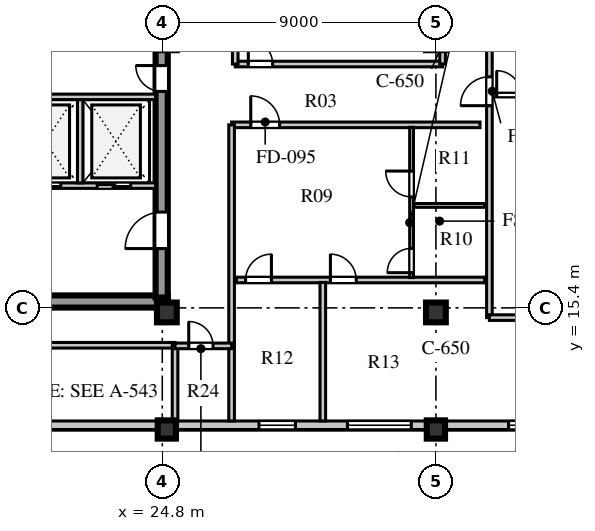
"""IFC4 building model, lengths in metres.
Left out: names, types, materials, properties, quantities, classifications, styles, units other than length and angle.
Written with IfcOpenShell. Run it as: python <this file> out.ifc"""

import sys

from ifc_helpers import new_model, si_unit, direction, frame, frame_2d, origin, origin_2d, place, context, subcontext, project, spatial, rectangle, extrude, element, fill, save


model = new_model("IFC4")
c1 = context("Model", 3, precision=1e-05, world=origin(), true_north=direction((0.0, 1.0)))
c2 = subcontext(c1, "Body", "Model", "MODEL_VIEW")
j1 = project(units=[si_unit("LENGTHUNIT", "METRE"), si_unit("PLANEANGLEUNIT", "RADIAN")], contexts=[c1])
p1 = place(None, origin())
s1 = spatial("IfcSite", under=j1, at=p1, CompositionType="ELEMENT")
p2 = place(p1, origin())
s2 = spatial("IfcBuilding", under=s1, at=p2, CompositionType="ELEMENT")
p3 = place(p2, frame((0.0, 0.0, 335.3)))
s3 = spatial("IfcBuildingStorey", under=s2, at=p3, CompositionType="ELEMENT", Elevation=335.3)
p4 = place(p3, frame((15.5, 15.61, 0.0), z_axis=(0.0, 0.0, 1.0), x_axis=(1.0, 0.0, 0.0)))
e1 = element("IfcWall", 1, at=p4, inside=s3, PredefinedType="SHEAR", context=c2, shape_type="SweptSolid", body=[
    extrude(rectangle(XDim=9.48, YDim=0.4, at=frame_2d((4.74, 0.0))), origin(), (0.0, 0.0, 1.0), 3.56),
])
p5 = place(p3, frame((24.78, 15.74, 0.0), z_axis=(0.0, 0.0, 1.0), x_axis=(0.0, 1.0, 0.0)))
e2 = element("IfcWall", 2, at=p5, inside=s3, PredefinedType="SHEAR", context=c2, shape_type="SweptSolid", body=[
    extrude(rectangle(XDim=25.76, YDim=0.4, at=frame_2d((12.88, 0.0))), origin(), (0.0, 0.0, 1.0), 3.56),
])
p6 = place(p5, frame((1.61, 0.0, 0.0)))
e3 = element("IfcOpeningElement", 3, at=p6, cuts=e2, PredefinedType="OPENING", context=c2, shape_type="SweptSolid", body=[
    extrude(rectangle(XDim=1.2, YDim=2.1, at=frame_2d((0.6, 1.05))), frame((0.0, 0.21, 0.0), z_axis=(0.0, -1.0, 0.0), x_axis=(1.0, 0.0, 0.0)), (0.0, 0.0, 1.0), 0.42),
])
p7 = place(p5, frame((6.78, 0.0, 0.0)))
e4 = element("IfcOpeningElement", 4, at=p7, cuts=e2, PredefinedType="OPENING", context=c2, shape_type="SweptSolid", body=[
    extrude(rectangle(XDim=0.85, YDim=2.06, at=frame_2d((0.425, 1.03))), frame((0.0, 0.21, 0.0), z_axis=(0.0, -1.0, 0.0), x_axis=(1.0, 0.0, 0.0)), (0.0, 0.0, 1.0), 0.42),
])
p8 = place(p5, frame((12.11, 0.0, 0.0)))
e5 = element("IfcOpeningElement", 5, at=p8, cuts=e2, PredefinedType="OPENING", context=c2, shape_type="SweptSolid", body=[
    extrude(rectangle(XDim=1.5, YDim=2.12, at=frame_2d((0.75, 1.06))), frame((0.0, 0.21, 0.0), z_axis=(0.0, -1.0, 0.0), x_axis=(1.0, 0.0, 0.0)), (0.0, 0.0, 1.0), 0.42),
])
p9 = place(p5, frame((20.11, 0.0, 0.0)))
e6 = element("IfcOpeningElement", 6, at=p9, cuts=e2, PredefinedType="OPENING", context=c2, shape_type="SweptSolid", body=[
    extrude(rectangle(XDim=1.2, YDim=2.12, at=frame_2d((0.6, 1.06))), frame((0.0, 0.21, 0.0), z_axis=(0.0, -1.0, 0.0), x_axis=(1.0, 0.0, 0.0)), (0.0, 0.0, 1.0), 0.42),
])
p10 = place(p5, frame((24.01, 0.0, 0.0)))
e7 = element("IfcOpeningElement", 7, at=p10, cuts=e2, PredefinedType="OPENING", context=c2, shape_type="SweptSolid", body=[
    extrude(rectangle(XDim=0.95, YDim=2.1, at=frame_2d((0.475, 1.05))), frame((0.0, 0.21, 0.0), z_axis=(0.0, -1.0, 0.0), x_axis=(1.0, 0.0, 0.0)), (0.0, 0.0, 1.0), 0.42),
])
for number, where, z_axis, x_axis in (
    (8, (24.95, 15.25, 0.0), (0.0, 0.0, 1.0), (1.0, 0.0, 0.0)),
    (9, (33.8, 15.25, 0.0), (0.0, 0.0, 1.0), (1.0, 0.0, 0.0)),
):
    element("IfcColumn", number, at=place(p3, frame(where, z_axis=z_axis, x_axis=x_axis)), inside=s3, PredefinedType="COLUMN", context=c2, shape_type="SweptSolid", body=[
        extrude(rectangle(XDim=0.65, YDim=0.65, at=origin_2d()), origin(), (0.0, 0.0, 1.0), 3.56),
    ])
for number, where, z_axis, x_axis in (
    (10, (24.95, 11.4, 0.0), (0.0, 0.0, 1.0), (1.0, 0.0, 0.0)),
    (11, (33.8, 11.4, 0.0), (0.0, 0.0, 1.0), (1.0, 0.0, 0.0)),
):
    element("IfcColumn", number, at=place(p3, frame(where, z_axis=z_axis, x_axis=x_axis)), inside=s3, PredefinedType="COLUMN", context=c2, shape_type="SweptSolid", body=[
        extrude(rectangle(XDim=0.6, YDim=0.6, at=origin_2d()), origin(), (0.0, 0.0, 1.0), 3.56),
    ])
p11 = place(p3, frame((13.8, 11.54, 0.0), z_axis=(0.0, 0.0, 1.0), x_axis=(1.0, 0.0, 0.0)))
e12 = element("IfcWall", 12, at=p11, inside=s3, PredefinedType="STANDARD", context=c2, shape_type="SweptSolid", body=[
    extrude(rectangle(XDim=26.0, YDim=0.28, at=frame_2d((13.0, 0.0))), origin(), (0.0, 0.0, 1.0), 2.92),
])
p12 = place(p11, frame((5.8, 0.0, 0.8)))
e13 = element("IfcOpeningElement", 13, at=p12, cuts=e12, PredefinedType="OPENING", context=c2, shape_type="SweptSolid", body=[
    extrude(rectangle(XDim=1.2, YDim=1.75, at=frame_2d((0.6, 0.875))), frame((0.0, 0.15, 0.0), z_axis=(0.0, -1.0, 0.0), x_axis=(1.0, 0.0, 0.0)), (0.0, 0.0, 1.0), 0.3),
])
p13 = place(p11, frame((14.18, 0.0, 0.8)))
e14 = element("IfcOpeningElement", 14, at=p13, cuts=e12, PredefinedType="OPENING", context=c2, shape_type="SweptSolid", body=[
    extrude(rectangle(XDim=1.2, YDim=1.75, at=frame_2d((0.6, 0.875))), frame((0.0, 0.15, 0.0), z_axis=(0.0, -1.0, 0.0), x_axis=(1.0, 0.0, 0.0)), (0.0, 0.0, 1.0), 0.3),
])
p14 = place(p11, frame((17.09, 0.0, 0.8)))
e15 = element("IfcOpeningElement", 15, at=p14, cuts=e12, PredefinedType="OPENING", context=c2, shape_type="SweptSolid", body=[
    extrude(rectangle(XDim=2.1, YDim=1.95, at=frame_2d((1.05, 0.975))), frame((0.0, 0.15, 0.0), z_axis=(0.0, -1.0, 0.0), x_axis=(1.0, 0.0, 0.0)), (0.0, 0.0, 1.0), 0.3),
])
p15 = place(p11, frame((22.39, 0.0, 0.8)))
e16 = element("IfcOpeningElement", 16, at=p15, cuts=e12, PredefinedType="OPENING", context=c2, shape_type="SweptSolid", body=[
    extrude(rectangle(XDim=1.35, YDim=1.9, at=frame_2d((0.675, 0.95))), frame((0.0, 0.15, 0.0), z_axis=(0.0, -1.0, 0.0), x_axis=(1.0, 0.0, 0.0)), (0.0, 0.0, 1.0), 0.3),
])
p16 = place(p3, frame((19.64, 19.42, 0.0), z_axis=(0.0, 0.0, 1.0), x_axis=(1.0, 0.0, 0.0)))
e17 = element("IfcWall", 17, at=p16, inside=s3, PredefinedType="SOLIDWALL", context=c2, shape_type="SweptSolid", body=[
    extrude(rectangle(XDim=4.94, YDim=0.18, at=frame_2d((2.47, 0.0))), origin(), (0.0, 0.0, 1.0), 3.56),
])
p17 = place(p16, frame((0.72, 0.0, 0.0)))
e18 = element("IfcOpeningElement", 18, at=p17, cuts=e17, PredefinedType="OPENING", context=c2, shape_type="SweptSolid", body=[
    extrude(rectangle(XDim=1.1, YDim=2.1, at=frame_2d((0.55, 1.05))), frame((0.0, 0.1, 0.0), z_axis=(0.0, -1.0, 0.0), x_axis=(1.0, 0.0, 0.0)), (0.0, 0.0, 1.0), 0.2),
])
p18 = place(p16, frame((3.02, 0.0, 0.0)))
e19 = element("IfcOpeningElement", 19, at=p18, cuts=e17, PredefinedType="OPENING", context=c2, shape_type="SweptSolid", body=[
    extrude(rectangle(XDim=1.1, YDim=2.1, at=frame_2d((0.55, 1.05))), frame((0.0, 0.1, 0.0), z_axis=(0.0, -1.0, 0.0), x_axis=(1.0, 0.0, 0.0)), (0.0, 0.0, 1.0), 0.2),
])
p19 = place(p3, frame((22.1, 19.51, 0.0), z_axis=(0.0, 0.0, 1.0), x_axis=(0.0, 1.0, 0.0)))
e20 = element("IfcWall", 20, at=p19, inside=s3, PredefinedType="SOLIDWALL", context=c2, shape_type="SweptSolid", body=[
    extrude(rectangle(XDim=2.74, YDim=0.18, at=frame_2d((1.37, 0.0))), origin(), (0.0, 0.0, 1.0), 3.56),
])
p20 = place(p3, frame((19.64, 22.34, 0.0), z_axis=(0.0, 0.0, 1.0), x_axis=(1.0, 0.0, 0.0)))
e21 = element("IfcWall", 21, at=p20, inside=s3, PredefinedType="SOLIDWALL", context=c2, shape_type="SweptSolid", body=[
    extrude(rectangle(XDim=4.94, YDim=0.18, at=frame_2d((2.47, 0.0))), origin(), (0.0, 0.0, 1.0), 3.56),
])
p21 = place(p3, frame((27.08, 21.42, 0.0), z_axis=(0.0, 0.0, 1.0), x_axis=(1.0, 0.0, 0.0)))
e22 = element("IfcWall", 22, at=p21, inside=s3, PredefinedType="SOLIDWALL", context=c2, shape_type="SweptSolid", body=[
    extrude(rectangle(XDim=8.17, YDim=0.185, at=frame_2d((4.085, 0.0))), origin(), (0.0, 0.0, 1.0), 3.26),
])
p22 = place(p21, frame((0.63, 0.0, 0.0)))
e23 = element("IfcOpeningElement", 23, at=p22, cuts=e22, PredefinedType="OPENING", context=c2, shape_type="SweptSolid", body=[
    extrude(rectangle(XDim=0.95, YDim=2.1, at=frame_2d((0.475, 1.05))), frame((0.0, 0.103, 0.0), z_axis=(0.0, -1.0, 0.0), x_axis=(1.0, 0.0, 0.0)), (0.0, 0.0, 1.0), 0.205),
])
p23 = place(p3, frame((27.08, 11.68, 0.0), z_axis=(0.0, 0.0, 1.0), x_axis=(0.0, 1.0, 0.0)))
e24 = element("IfcWall", 24, at=p23, inside=s3, PredefinedType="SOLIDWALL", context=c2, shape_type="SweptSolid", body=[
    extrude(rectangle(XDim=9.74, YDim=0.185, at=frame_2d((4.87, 0.0))), origin(), (0.0, 0.0, 1.0), 3.56),
])
p24 = place(p3, frame((14.15, 14.17, 0.0), z_axis=(0.0, 0.0, 1.0), x_axis=(1.0, 0.0, 0.0)))
e25 = element("IfcWall", 25, at=p24, inside=s3, PredefinedType="SOLIDWALL", context=c2, shape_type="SweptSolid", body=[
    extrude(rectangle(XDim=11.07, YDim=0.185, at=frame_2d((5.535, 0.0))), origin(), (0.0, 0.0, 1.0), 3.56),
])
p25 = place(p24, frame((3.2, 0.0, 0.0)))
e26 = element("IfcOpeningElement", 26, at=p25, cuts=e25, PredefinedType="OPENING", context=c2, shape_type="SweptSolid", body=[
    extrude(rectangle(XDim=0.95, YDim=2.08, at=frame_2d((0.475, 1.04))), frame((0.0, 0.103, 0.0), z_axis=(0.0, -1.0, 0.0), x_axis=(1.0, 0.0, 0.0)), (0.0, 0.0, 1.0), 0.205),
])
p26 = place(p3, frame((25.22, 11.68, 0.0), z_axis=(0.0, 0.0, 1.0), x_axis=(0.0, 1.0, 0.0)))
e27 = element("IfcWall", 27, at=p26, inside=s3, PredefinedType="SOLIDWALL", context=c2, shape_type="SweptSolid", body=[
    extrude(rectangle(XDim=2.49, YDim=0.185, at=frame_2d((1.245, 0.0))), origin(), (0.0, 0.0, 1.0), 3.11),
])
p27 = place(p3, frame((27.24, 16.317, 0.0), z_axis=(0.0, 0.0, 1.0), x_axis=(1.0, 0.0, 0.0)))
e28 = element("IfcWall", 28, at=p27, inside=s3, PredefinedType="SOLIDWALL", context=c2, shape_type="SweptSolid", body=[
    extrude(rectangle(XDim=8.16, YDim=0.185, at=frame_2d((4.08, 0.0))), origin(), (0.0, 0.0, 1.0), 3.56),
])
p28 = place(p27, frame((0.3, 0.0, 0.0)))
e29 = element("IfcOpeningElement", 29, at=p28, cuts=e28, PredefinedType="OPENING", context=c2, shape_type="SweptSolid", body=[
    extrude(rectangle(XDim=0.85, YDim=2.08, at=frame_2d((0.425, 1.04))), frame((0.0, 0.103, 0.0), z_axis=(0.0, -1.0, 0.0), x_axis=(1.0, 0.0, 0.0)), (0.0, 0.0, 1.0), 0.205),
])
p29 = place(p27, frame((3.09, 0.0, 0.0)))
e30 = element("IfcOpeningElement", 30, at=p29, cuts=e28, PredefinedType="OPENING", context=c2, shape_type="SweptSolid", body=[
    extrude(rectangle(XDim=0.85, YDim=2.08, at=frame_2d((0.425, 1.04))), frame((0.0, 0.103, 0.0), z_axis=(0.0, -1.0, 0.0), x_axis=(1.0, 0.0, 0.0)), (0.0, 0.0, 1.0), 0.205),
])
p30 = place(p3, frame((33.0, 16.397, 0.0), z_axis=(0.0, 0.0, 1.0), x_axis=(0.0, 1.0, 0.0)))
e31 = element("IfcWall", 31, at=p30, inside=s3, PredefinedType="PLUMBINGWALL", context=c2, shape_type="SweptSolid", body=[
    extrude(rectangle(XDim=4.943, YDim=0.125, at=frame_2d((2.472, 0.0))), origin(), (0.0, 0.0, 1.0), 3.56),
])
p31 = place(p30, frame((0.16, 0.0, 0.0)))
e32 = element("IfcOpeningElement", 32, at=p31, cuts=e31, PredefinedType="OPENING", context=c2, shape_type="SweptSolid", body=[
    extrude(rectangle(XDim=0.8, YDim=2.05, at=frame_2d((0.4, 1.025))), frame((0.0, 0.073, 0.0), z_axis=(0.0, -1.0, 0.0), x_axis=(1.0, 0.0, 0.0)), (0.0, 0.0, 1.0), 0.145),
])
p32 = place(p30, frame((2.653, 0.0, 0.0)))
e33 = element("IfcOpeningElement", 33, at=p32, cuts=e31, PredefinedType="OPENING", context=c2, shape_type="SweptSolid", body=[
    extrude(rectangle(XDim=0.85, YDim=2.08, at=frame_2d((0.425, 1.04))), frame((0.0, 0.073, 0.0), z_axis=(0.0, -1.0, 0.0), x_axis=(1.0, 0.0, 0.0)), (0.0, 0.0, 1.0), 0.145),
])
p33 = place(p3, frame((33.08, 18.77, 0.0), z_axis=(0.0, 0.0, 1.0), x_axis=(1.0, 0.0, 0.0)))
e34 = element("IfcWall", 34, at=p33, inside=s3, PredefinedType="PLUMBINGWALL", context=c2, shape_type="SweptSolid", body=[
    extrude(rectangle(XDim=2.32, YDim=0.125, at=frame_2d((1.16, 0.0))), origin(), (0.0, 0.0, 1.0), 3.56),
])
p34 = place(p3, frame((30.08, 11.68, 0.0), z_axis=(0.0, 0.0, 1.0), x_axis=(0.0, 1.0, 0.0)))
e35 = element("IfcWall", 35, at=p34, inside=s3, PredefinedType="SOLIDWALL", context=c2, shape_type="SweptSolid", body=[
    extrude(rectangle(XDim=4.557, YDim=0.185, at=frame_2d((2.279, 0.0))), origin(), (0.0, 0.0, 1.0), 3.56),
])
p35 = place(p3, frame((35.56, 15.08, 0.0), z_axis=(0.0, 0.0, 1.0), x_axis=(0.0, 1.0, 0.0)))
e36 = element("IfcWall", 36, at=p35, inside=s3, PredefinedType="SOLIDWALL", context=c2, shape_type="SweptSolid", body=[
    extrude(rectangle(XDim=12.17, YDim=0.185, at=frame_2d((6.085, 0.0))), origin(), (0.0, 0.0, 1.0), 3.56),
])
p36 = place(p35, frame((6.97, 0.0, 0.0)))
e37 = element("IfcOpeningElement", 37, at=p36, cuts=e36, PredefinedType="OPENING", context=c2, shape_type="SweptSolid", body=[
    extrude(rectangle(XDim=0.95, YDim=2.1, at=frame_2d((0.475, 1.05))), frame((0.0, 0.103, 0.0), z_axis=(0.0, -1.0, 0.0), x_axis=(1.0, 0.0, 0.0)), (0.0, 0.0, 1.0), 0.205),
])
p37 = place(p3, frame((35.56, 15.08, 0.0), z_axis=(0.0, 0.0, 1.0), x_axis=(1.0, 0.0, 0.0)))
e38 = element("IfcWall", 38, at=p37, inside=s3, PredefinedType="SOLIDWALL", context=c2, shape_type="SweptSolid", body=[
    extrude(rectangle(XDim=7.36, YDim=0.185, at=frame_2d((3.68, 0.0))), origin(), (0.0, 0.0, 1.0), 3.11),
])
p38 = place(p3, frame((35.64, 22.4, 0.0), z_axis=(0.0, 0.0, 1.0), x_axis=(1.0, 0.0, 0.0)))
e39 = element("IfcWall", 39, at=p38, inside=s3, PredefinedType="PLUMBINGWALL", context=c2, shape_type="SweptSolid", body=[
    extrude(rectangle(XDim=3.851, YDim=0.125, at=frame_2d((1.926, 0.0))), origin(), (0.0, 0.0, 1.0), 3.56),
])
p39 = place(p38, frame((0.16, 0.0, 0.0)))
e40 = element("IfcOpeningElement", 40, at=p39, cuts=e39, PredefinedType="OPENING", context=c2, shape_type="SweptSolid", body=[
    extrude(rectangle(XDim=0.8, YDim=2.05, at=frame_2d((0.4, 1.025))), frame((0.0, 0.073, 0.0), z_axis=(0.0, -1.0, 0.0), x_axis=(1.0, 0.0, 0.0)), (0.0, 0.0, 1.0), 0.145),
])
p40 = place(p38, frame((2.108, 0.0, 0.0)))
e41 = element("IfcOpeningElement", 41, at=p40, cuts=e39, PredefinedType="OPENING", context=c2, shape_type="SweptSolid", body=[
    extrude(rectangle(XDim=0.8, YDim=2.05, at=frame_2d((0.4, 1.025))), frame((0.0, 0.073, 0.0), z_axis=(0.0, -1.0, 0.0), x_axis=(1.0, 0.0, 0.0)), (0.0, 0.0, 1.0), 0.145),
])
p41 = place(p3, frame((27.2, 23.42, 0.0), z_axis=(0.0, 0.0, 1.0), x_axis=(1.0, 0.0, 0.0)))
e42 = element("IfcWall", 42, at=p41, inside=s3, PredefinedType="SOLIDWALL", context=c2, shape_type="SweptSolid", body=[
    extrude(rectangle(XDim=6.82, YDim=0.185, at=frame_2d((3.41, 0.0))), origin(), (0.0, 0.0, 1.0), 3.56),
])
p42 = place(p41, frame((0.43, 0.0, 0.0)))
e43 = element("IfcOpeningElement", 43, at=p42, cuts=e42, PredefinedType="OPENING", context=c2, shape_type="SweptSolid", body=[
    extrude(rectangle(XDim=0.8, YDim=2.05, at=frame_2d((0.4, 1.025))), frame((0.0, 0.103, 0.0), z_axis=(0.0, -1.0, 0.0), x_axis=(1.0, 0.0, 0.0)), (0.0, 0.0, 1.0), 0.205),
])
p43 = place(p3, frame((27.2, 23.42, 0.0), z_axis=(0.0, 0.0, 1.0), x_axis=(0.0, 1.0, 0.0)))
e44 = element("IfcWall", 44, at=p43, inside=s3, PredefinedType="SOLIDWALL", context=c2, shape_type="SweptSolid", body=[
    extrude(rectangle(XDim=1.46, YDim=0.185, at=frame_2d((0.73, 0.0))), origin(), (0.0, 0.0, 1.0), 3.56),
])
p44 = place(p3, frame((34.02, 23.42, 0.0), z_axis=(0.0, 0.0, 1.0), x_axis=(0.0, 1.0, 0.0)))
e45 = element("IfcWall", 45, at=p44, inside=s3, PredefinedType="SOLIDWALL", context=c2, shape_type="SweptSolid", body=[
    extrude(rectangle(XDim=1.46, YDim=0.185, at=frame_2d((0.73, 0.0))), origin(), (0.0, 0.0, 1.0), 2.96),
])
p45 = place(p3, frame((25.22, 14.15, 0.0), z_axis=(0.0, 0.0, 1.0), x_axis=(1.0, 0.0, 0.0)))
e46 = element("IfcWall", 46, at=p45, inside=s3, PredefinedType="SOLIDWALL", context=c2, shape_type="SweptSolid", body=[
    extrude(rectangle(XDim=1.86, YDim=0.185, at=frame_2d((0.93, 0.0))), origin(), (0.0, 0.0, 1.0), 3.56),
])
p46 = place(p45, frame((0.45, 0.0, 0.0)))
e47 = element("IfcOpeningElement", 47, at=p46, cuts=e46, PredefinedType="OPENING", context=c2, shape_type="SweptSolid", body=[
    extrude(rectangle(XDim=0.8, YDim=2.05, at=frame_2d((0.4, 1.025))), frame((0.0, 0.103, 0.0), z_axis=(0.0, -1.0, 0.0), x_axis=(1.0, 0.0, 0.0)), (0.0, 0.0, 1.0), 0.205),
])
p47 = place(p13, origin())
e48 = element("IfcWindow", 48, at=p47, inside=s3, PartitioningType="SINGLE_PANEL", PredefinedType="WINDOW", context=c2, shape_type="SweptSolid", body=[
    extrude(rectangle(XDim=1.2, YDim=1.75, at=frame_2d((0.6, 0.875))), frame((0.0, 0.03, 0.0), z_axis=(0.0, -1.0, 0.0), x_axis=(1.0, 0.0, 0.0)), (0.0, 0.0, 1.0), 0.06),
])
fill(e14, e48)
p48 = place(p14, origin())
e49 = element("IfcWindow", 49, at=p48, inside=s3, PartitioningType="SINGLE_PANEL", PredefinedType="WINDOW", context=c2, shape_type="SweptSolid", body=[
    extrude(rectangle(XDim=2.1, YDim=1.95, at=frame_2d((1.05, 0.975))), frame((0.0, 0.03, 0.0), z_axis=(0.0, -1.0, 0.0), x_axis=(1.0, 0.0, 0.0)), (0.0, 0.0, 1.0), 0.06),
])
fill(e15, e49)
p49 = place(p15, origin())
e50 = element("IfcWindow", 50, at=p49, inside=s3, PartitioningType="SINGLE_PANEL", PredefinedType="WINDOW", context=c2, shape_type="SweptSolid", body=[
    extrude(rectangle(XDim=1.35, YDim=1.9, at=frame_2d((0.675, 0.95))), frame((0.0, 0.03, 0.0), z_axis=(0.0, -1.0, 0.0), x_axis=(1.0, 0.0, 0.0)), (0.0, 0.0, 1.0), 0.06),
])
fill(e16, e50)
p50 = place(p17, origin())
e51 = element("IfcDoor", 51, at=p50, inside=s3, OperationType="DOUBLE_DOOR_SLIDING", PredefinedType="DOOR", context=c2, shape_type="SweptSolid", body=[
    extrude(rectangle(XDim=1.1, YDim=2.1, at=frame_2d((0.55, 1.05))), frame((0.0, 0.025, 0.0), z_axis=(0.0, -1.0, 0.0), x_axis=(1.0, 0.0, 0.0)), (0.0, 0.0, 1.0), 0.05),
])
fill(e18, e51)
p51 = place(p18, origin())
e52 = element("IfcDoor", 52, at=p51, inside=s3, OperationType="DOUBLE_DOOR_SLIDING", PredefinedType="DOOR", context=c2, shape_type="SweptSolid", body=[
    extrude(rectangle(XDim=1.1, YDim=2.1, at=frame_2d((0.55, 1.05))), frame((0.0, 0.025, 0.0), z_axis=(0.0, -1.0, 0.0), x_axis=(1.0, 0.0, 0.0)), (0.0, 0.0, 1.0), 0.05),
])
fill(e19, e52)
p52 = place(p6, frame((1.2, 0.0, 0.0), z_axis=(0.0, 0.0, 1.0), x_axis=(-1.0, 0.0, 0.0)))
e53 = element("IfcDoor", 53, at=p52, inside=s3, OperationType="SINGLE_SWING_RIGHT", PredefinedType="DOOR", context=c2, shape_type="SweptSolid", body=[
    extrude(rectangle(XDim=1.2, YDim=2.1, at=frame_2d((0.6, 1.05))), frame((0.0, 0.025, 0.0), z_axis=(0.0, -1.0, 0.0), x_axis=(1.0, 0.0, 0.0)), (0.0, 0.0, 1.0), 0.05),
])
fill(e3, e53)
p53 = place(p7, frame((0.85, 0.0, 0.0), z_axis=(0.0, 0.0, 1.0), x_axis=(-1.0, 0.0, 0.0)))
e54 = element("IfcDoor", 54, at=p53, inside=s3, OperationType="SINGLE_SWING_LEFT", PredefinedType="DOOR", context=c2, shape_type="SweptSolid", body=[
    extrude(rectangle(XDim=0.85, YDim=2.06, at=frame_2d((0.425, 1.03))), frame((0.0, 0.025, 0.0), z_axis=(0.0, -1.0, 0.0), x_axis=(1.0, 0.0, 0.0)), (0.0, 0.0, 1.0), 0.05),
])
fill(e4, e54)
p54 = place(p31, origin())
e55 = element("IfcDoor", 55, at=p54, inside=s3, OperationType="SINGLE_SWING_LEFT", PredefinedType="DOOR", context=c2, shape_type="SweptSolid", body=[
    extrude(rectangle(XDim=0.8, YDim=2.05, at=frame_2d((0.4, 1.025))), frame((0.0, 0.025, 0.0), z_axis=(0.0, -1.0, 0.0), x_axis=(1.0, 0.0, 0.0)), (0.0, 0.0, 1.0), 0.05),
])
fill(e32, e55)
p55 = place(p32, origin())
e56 = element("IfcDoor", 56, at=p55, inside=s3, OperationType="SINGLE_SWING_RIGHT", PredefinedType="DOOR", context=c2, shape_type="SweptSolid", body=[
    extrude(rectangle(XDim=0.85, YDim=2.08, at=frame_2d((0.425, 1.04))), frame((0.0, 0.025, 0.0), z_axis=(0.0, -1.0, 0.0), x_axis=(1.0, 0.0, 0.0)), (0.0, 0.0, 1.0), 0.05),
])
fill(e33, e56)
p56 = place(p28, frame((0.85, 0.0, 0.0), z_axis=(0.0, 0.0, 1.0), x_axis=(-1.0, 0.0, 0.0)))
e57 = element("IfcDoor", 57, at=p56, inside=s3, OperationType="SINGLE_SWING_LEFT", PredefinedType="DOOR", context=c2, shape_type="SweptSolid", body=[
    extrude(rectangle(XDim=0.85, YDim=2.08, at=frame_2d((0.425, 1.04))), frame((0.0, 0.025, 0.0), z_axis=(0.0, -1.0, 0.0), x_axis=(1.0, 0.0, 0.0)), (0.0, 0.0, 1.0), 0.05),
])
fill(e29, e57)
p57 = place(p29, frame((0.85, 0.0, 0.0), z_axis=(0.0, 0.0, 1.0), x_axis=(-1.0, 0.0, 0.0)))
e58 = element("IfcDoor", 58, at=p57, inside=s3, OperationType="SINGLE_SWING_RIGHT", PredefinedType="DOOR", context=c2, shape_type="SweptSolid", body=[
    extrude(rectangle(XDim=0.85, YDim=2.08, at=frame_2d((0.425, 1.04))), frame((0.0, 0.025, 0.0), z_axis=(0.0, -1.0, 0.0), x_axis=(1.0, 0.0, 0.0)), (0.0, 0.0, 1.0), 0.05),
])
fill(e30, e58)
p58 = place(p22, frame((0.95, 0.0, 0.0), z_axis=(0.0, 0.0, 1.0), x_axis=(-1.0, 0.0, 0.0)))
e59 = element("IfcDoor", 59, at=p58, inside=s3, OperationType="SINGLE_SWING_RIGHT", PredefinedType="DOOR", context=c2, shape_type="SweptSolid", body=[
    extrude(rectangle(XDim=0.95, YDim=2.1, at=frame_2d((0.475, 1.05))), frame((0.0, 0.025, 0.0), z_axis=(0.0, -1.0, 0.0), x_axis=(1.0, 0.0, 0.0)), (0.0, 0.0, 1.0), 0.05),
])
fill(e23, e59)
p59 = place(p39, origin())
e60 = element("IfcDoor", 60, at=p59, inside=s3, OperationType="SINGLE_SWING_LEFT", PredefinedType="DOOR", context=c2, shape_type="SweptSolid", body=[
    extrude(rectangle(XDim=0.8, YDim=2.05, at=frame_2d((0.4, 1.025))), frame((0.0, 0.025, 0.0), z_axis=(0.0, -1.0, 0.0), x_axis=(1.0, 0.0, 0.0)), (0.0, 0.0, 1.0), 0.05),
])
fill(e40, e60)
p60 = place(p36, origin())
e61 = element("IfcDoor", 61, at=p60, inside=s3, OperationType="SINGLE_SWING_LEFT", PredefinedType="DOOR", context=c2, shape_type="SweptSolid", body=[
    extrude(rectangle(XDim=0.95, YDim=2.1, at=frame_2d((0.475, 1.05))), frame((0.0, 0.025, 0.0), z_axis=(0.0, -1.0, 0.0), x_axis=(1.0, 0.0, 0.0)), (0.0, 0.0, 1.0), 0.05),
])
fill(e37, e61)
p61 = place(p42, origin())
e62 = element("IfcDoor", 62, at=p61, inside=s3, OperationType="SINGLE_SWING_LEFT", PredefinedType="DOOR", context=c2, shape_type="SweptSolid", body=[
    extrude(rectangle(XDim=0.8, YDim=2.05, at=frame_2d((0.4, 1.025))), frame((0.0, 0.025, 0.0), z_axis=(0.0, -1.0, 0.0), x_axis=(1.0, 0.0, 0.0)), (0.0, 0.0, 1.0), 0.05),
])
fill(e43, e62)
p62 = place(p46, origin())
e63 = element("IfcDoor", 63, at=p62, inside=s3, OperationType="SINGLE_SWING_LEFT", PredefinedType="DOOR", context=c2, shape_type="SweptSolid", body=[
    extrude(rectangle(XDim=0.8, YDim=2.05, at=frame_2d((0.4, 1.025))), frame((0.0, 0.025, 0.0), z_axis=(0.0, -1.0, 0.0), x_axis=(1.0, 0.0, 0.0)), (0.0, 0.0, 1.0), 0.05),
])
fill(e47, e63)
save(model, sys.argv[1])
